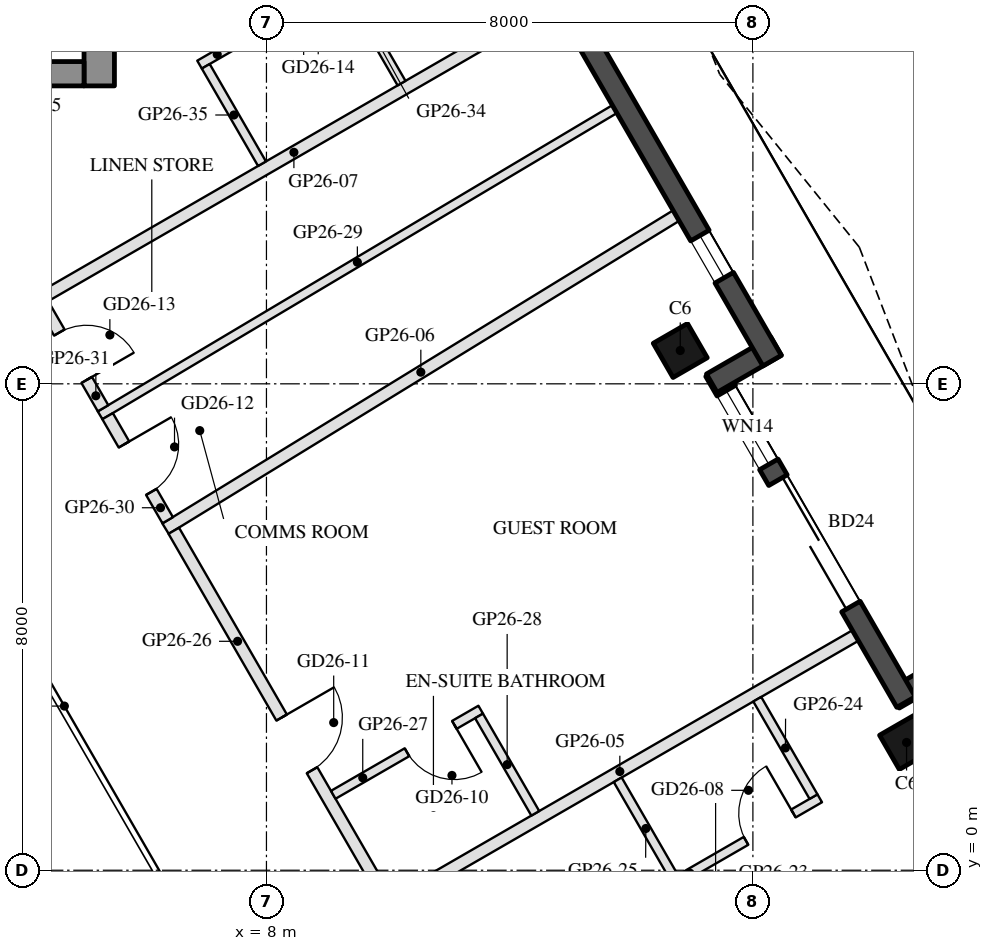
"""IFC4 building model, lengths in metres.
Left out: names, types, materials, properties, quantities, classifications, styles, units other than length and angle.
Written with IfcOpenShell. Run it as: python <this file> out.ifc"""

import sys

from ifc_helpers import new_model, si_unit, direction, frame, frame_2d, origin, origin_2d, place, context, subcontext, project, spatial, rectangle, hollow_rectangle, extrude, boolean, halfspace, element, fill, save


model = new_model("IFC4")
c1 = context("Model", 3, precision=1e-05, world=origin(), true_north=direction((0.0, 1.0)))
c2 = subcontext(c1, "Body", "Model", "MODEL_VIEW")
j1 = project(units=[si_unit("LENGTHUNIT", "METRE"), si_unit("PLANEANGLEUNIT", "RADIAN")], contexts=[c1])
p1 = place(None, origin())
s1 = spatial("IfcSite", under=j1, at=p1, CompositionType="ELEMENT")
p2 = place(p1, origin())
s2 = spatial("IfcBuilding", under=s1, at=p2, CompositionType="ELEMENT")
p3 = place(p2, frame((0.0, 0.0, 268.9)))
s3 = spatial("IfcBuildingStorey", under=s2, at=p3, CompositionType="ELEMENT", Elevation=268.9)
p4 = place(p3, frame((18.527, 2.102, 0.0), z_axis=(0.0, 0.0, 1.0), x_axis=(-0.5, 0.866025403784, 0.0)))
e1 = element("IfcColumn", 1, at=p4, inside=s3, PredefinedType="COLUMN", context=c2, shape_type="SweptSolid", body=[
    boolean("DIFFERENCE", extrude(hollow_rectangle(XDim=0.65, YDim=0.65, WallThickness=0.03, at=origin_2d()), origin(), (0.0, 0.0, 1.0), 3.7), halfspace(frame((0.0, 0.0, 0.04), z_axis=(0.0, 0.0, 1.0), x_axis=(1.0, 0.0, 0.0)), True)),
])
p5 = place(p3, frame((14.805, 8.548, 0.0), z_axis=(0.0, 0.0, 1.0), x_axis=(-0.5, 0.866025403784, 0.0)))
e2 = element("IfcColumn", 2, at=p5, inside=s3, PredefinedType="COLUMN", context=c2, shape_type="SweptSolid", body=[
    boolean("DIFFERENCE", extrude(hollow_rectangle(XDim=0.65, YDim=0.65, WallThickness=0.03, at=origin_2d()), origin(), (0.0, 0.0, 1.0), 3.7), halfspace(frame((0.0, 0.0, 0.037), z_axis=(0.0, 0.0, 1.0), x_axis=(1.0, 0.0, 0.0)), True)),
])
p6 = place(p3, frame((19.377, 3.429, 0.0), z_axis=(0.0, 0.0, 1.0), x_axis=(-0.866092288191, -0.499884134912, 0.0)))
e3 = element("IfcWall", 3, at=p6, inside=s3, PredefinedType="SOLIDWALL", context=c2, shape_type="SweptSolid", body=[
    extrude(rectangle(XDim=1.22, YDim=0.35, at=frame_2d((0.61, 0.0))), origin(), (0.0, 0.0, 1.0), 3.55),
])
p7 = place(p3, frame((18.519, 2.766, 0.0), z_axis=(0.0, 0.0, 1.0), x_axis=(-0.499995993298, 0.866027717042, 0.0)))
e4 = element("IfcWall", 4, at=p7, inside=s3, PredefinedType="SOLIDWALL", context=c2, shape_type="SweptSolid", body=[
    extrude(rectangle(XDim=6.284, YDim=0.35, at=frame_2d((3.142, 0.0))), origin(), (0.0, 0.0, 1.0), 3.55),
])
p8 = place(p7, frame((1.813, 0.0, 0.0)))
e5 = element("IfcOpeningElement", 5, at=p8, cuts=e4, PredefinedType="OPENING", context=c2, shape_type="SweptSolid", body=[
    extrude(rectangle(XDim=2.4, YDim=2.4, at=frame_2d((1.2, 1.2))), frame((0.0, 0.185, 0.0), z_axis=(0.0, -1.0, 0.0), x_axis=(1.0, 0.0, 0.0)), (0.0, 0.0, 1.0), 0.37),
])
p9 = place(p7, frame((4.513, 0.0, 0.3)))
e6 = element("IfcOpeningElement", 6, at=p9, cuts=e4, PredefinedType="OPENING", context=c2, shape_type="SweptSolid", body=[
    extrude(rectangle(XDim=1.4, YDim=2.65, at=frame_2d((0.7, 1.325))), frame((0.0, 0.185, 0.0), z_axis=(0.0, -1.0, 0.0), x_axis=(1.0, 0.0, 0.0)), (0.0, 0.0, 1.0), 0.37),
])
p10 = place(p3, frame((15.324, 8.01, 0.0), z_axis=(0.0, 0.0, 1.0), x_axis=(0.866005645448, 0.500034220881, 0.0)))
e7 = element("IfcWall", 7, at=p10, inside=s3, PredefinedType="SOLIDWALL", context=c2, shape_type="SweptSolid", body=[
    extrude(rectangle(XDim=1.22, YDim=0.35, at=frame_2d((0.61, 0.0))), origin(), (0.0, 0.0, 1.0), 3.55),
])
p11 = place(p3, frame((16.316, 8.381, 0.0), z_axis=(0.0, 0.0, 1.0), x_axis=(-0.500005190411, 0.866022407078, 0.0)))
e8 = element("IfcWall", 8, at=p11, inside=s3, PredefinedType="SOLIDWALL", context=c2, shape_type="SweptSolid", body=[
    extrude(rectangle(XDim=9.244, YDim=0.35, at=frame_2d((4.622, 0.0))), origin(), (0.0, 0.0, 1.0), 3.55),
])
p12 = place(p11, frame((1.575, 0.0, 0.3)))
e9 = element("IfcOpeningElement", 9, at=p12, cuts=e8, PredefinedType="OPENING", context=c2, shape_type="SweptSolid", body=[
    extrude(rectangle(XDim=0.8, YDim=2.65, at=frame_2d((0.4, 1.325))), frame((0.0, 0.185, 0.0), z_axis=(0.0, -1.0, 0.0), x_axis=(1.0, 0.0, 0.0)), (0.0, 0.0, 1.0), 0.37),
])
p13 = place(p3, frame((5.25, 12.9, 0.0), z_axis=(0.0, 0.0, 1.0), x_axis=(0.0, 1.0, 0.0)))
e10 = element("IfcWall", 10, at=p13, inside=s3, PredefinedType="SHEAR", context=c2, shape_type="SweptSolid", body=[
    extrude(rectangle(XDim=13.031, YDim=0.5, at=frame_2d((6.516, 0.0))), origin(), (0.0, 0.0, 1.0), 3.5),
])
p14 = place(p3, frame((5.0, 13.1, 0.0), z_axis=(0.0, 0.0, 1.0), x_axis=(-1.0, 0.0, 0.0)))
e11 = element("IfcWall", 11, at=p14, inside=s3, PredefinedType="SHEAR", context=c2, shape_type="SweptSolid", body=[
    extrude(rectangle(XDim=10.0, YDim=0.4, at=frame_2d((5.0, 0.0))), origin(), (0.0, 0.0, 1.0), 3.5),
])
p15 = place(p14, frame((3.55, 0.0, 0.0)))
e12 = element("IfcOpeningElement", 12, at=p15, cuts=e11, PredefinedType="OPENING", context=c2, shape_type="SweptSolid", body=[
    extrude(rectangle(XDim=1.1, YDim=2.1, at=frame_2d((0.55, 1.05))), frame((0.0, 0.21, 0.0), z_axis=(0.0, -1.0, 0.0), x_axis=(1.0, 0.0, 0.0)), (0.0, 0.0, 1.0), 0.42),
])
p16 = place(p14, frame((5.85, 0.0, 0.0)))
e13 = element("IfcOpeningElement", 13, at=p16, cuts=e11, PredefinedType="OPENING", context=c2, shape_type="SweptSolid", body=[
    extrude(rectangle(XDim=1.4, YDim=2.1, at=frame_2d((0.7, 1.05))), frame((0.0, 0.21, 0.0), z_axis=(0.0, -1.0, 0.0), x_axis=(1.0, 0.0, 0.0)), (0.0, 0.0, 1.0), 0.42),
])
p17 = place(p3, frame((17.685, 3.86, 0.0), z_axis=(0.0, 0.0, 1.0), x_axis=(-0.866026066645, -0.499998851889, 0.0)))
e14 = element("IfcWall", 14, at=p17, inside=s3, PredefinedType="PARTITIONING", context=c2, shape_type="SweptSolid", body=[
    extrude(rectangle(XDim=8.946, YDim=0.2, at=frame_2d((4.473, 0.0))), origin(), (0.0, 0.0, 1.0), 3.16),
])
p18 = place(p3, frame((14.737, 10.766, 0.0), z_axis=(0.0, 0.0, 1.0), x_axis=(-0.852501485732, -0.522724800277, 0.0)))
e15 = element("IfcWall", 15, at=p18, inside=s3, PredefinedType="PARTITIONING", context=c2, shape_type="SweptSolid", body=[
    extrude(rectangle(XDim=9.849, YDim=0.2, at=frame_2d((4.925, 0.0))), origin(), (0.0, 0.0, 1.0), 3.16),
])
p19 = place(p3, frame((12.715, 14.269, 0.0), z_axis=(0.0, 0.0, 1.0), x_axis=(-0.866024954444, -0.500000778279, 0.0)))
e16 = element("IfcWall", 16, at=p19, inside=s3, PredefinedType="PARTITIONING", context=c2, shape_type="SweptSolid", body=[
    extrude(rectangle(XDim=9.846, YDim=0.2, at=frame_2d((4.923, 0.0))), origin(), (0.0, 0.0, 1.0), 3.16),
])
p20 = place(p3, frame((14.674, -0.217, 0.0), z_axis=(0.0, 0.0, 1.0), x_axis=(0.866056369097, 0.49994636267, 0.0)))
e17 = element("IfcWall", 17, at=p20, inside=s3, PredefinedType="PARTITIONING", context=c2, shape_type="SweptSolid", body=[
    extrude(rectangle(XDim=2.8, YDim=0.15, at=frame_2d((1.4, 0.0))), origin(), (0.0, 0.0, 1.0), 3.0),
])
p21 = place(p20, frame((1.4, 0.0, 0.0)))
e18 = element("IfcOpeningElement", 18, at=p21, cuts=e17, PredefinedType="OPENING", context=c2, shape_type="SweptSolid", body=[
    extrude(rectangle(XDim=0.9, YDim=2.1, at=frame_2d((0.45, 1.05))), frame((0.0, 0.085, 0.0), z_axis=(0.0, -1.0, 0.0), x_axis=(1.0, 0.0, 0.0)), (0.0, 0.0, 1.0), 0.17),
])
p22 = place(p3, frame((16.997, 1.211, 0.0), z_axis=(0.0, 0.0, 1.0), x_axis=(-0.500042316284, 0.866000971088, 0.0)))
e19 = element("IfcWall", 19, at=p22, inside=s3, PredefinedType="PARTITIONING", context=c2, shape_type="SweptSolid", body=[
    extrude(rectangle(XDim=1.85, YDim=0.15, at=frame_2d((0.925, 0.0))), origin(), (0.0, 0.0, 1.0), 3.0),
])
p23 = place(p3, frame((14.702, -0.115, 0.0), z_axis=(0.0, 0.0, 1.0), x_axis=(-0.499985172903, 0.866033964044, 0.0)))
e20 = element("IfcWall", 20, at=p23, inside=s3, PredefinedType="PARTITIONING", context=c2, shape_type="SweptSolid", body=[
    extrude(rectangle(XDim=1.85, YDim=0.15, at=frame_2d((0.925, 0.0))), origin(), (0.0, 0.0, 1.0), 3.0),
])
p24 = place(p3, frame((6.476, 5.583, 0.0), z_axis=(0.0, 0.0, 1.0), x_axis=(0.499989243959, -0.866031613699, 0.0)))
e21 = element("IfcWall", 21, at=p24, inside=s3, PredefinedType="PARTITIONING", context=c2, shape_type="SweptSolid", body=[
    extrude(rectangle(XDim=6.997, YDim=0.2, at=frame_2d((3.499, 0.0))), origin(), (0.0, 0.0, 1.0), 3.0),
])
p25 = place(p24, frame((3.547, 0.0, 0.0)))
e22 = element("IfcOpeningElement", 22, at=p25, cuts=e21, PredefinedType="OPENING", context=c2, shape_type="SweptSolid", body=[
    extrude(rectangle(XDim=1.0, YDim=2.1, at=frame_2d((0.5, 1.05))), frame((0.0, 0.11, 0.0), z_axis=(0.0, -1.0, 0.0), x_axis=(1.0, 0.0, 0.0)), (0.0, 0.0, 1.0), 0.22),
])
p26 = place(p3, frame((11.524, 2.641, 0.0), z_axis=(0.0, 0.0, 1.0), x_axis=(-0.866018616679, -0.500011755427, 0.0)))
e23 = element("IfcWall", 23, at=p26, inside=s3, PredefinedType="PARTITIONING", context=c2, shape_type="SweptSolid", body=[
    extrude(rectangle(XDim=2.8, YDim=0.15, at=frame_2d((1.4, 0.0))), origin(), (0.0, 0.0, 1.0), 3.55),
])
p27 = place(p26, frame((0.5, 0.0, 0.0)))
e24 = element("IfcOpeningElement", 24, at=p27, cuts=e23, PredefinedType="OPENING", context=c2, shape_type="SweptSolid", body=[
    extrude(rectangle(XDim=0.9, YDim=2.1, at=frame_2d((0.45, 1.05))), frame((0.0, 0.085, 0.0), z_axis=(0.0, -1.0, 0.0), x_axis=(1.0, 0.0, 0.0)), (0.0, 0.0, 1.0), 0.17),
])
p28 = place(p3, frame((12.421, 0.936, 0.0), z_axis=(0.0, 0.0, 1.0), x_axis=(-0.500042316284, 0.866000971088, 0.0)))
e25 = element("IfcWall", 25, at=p28, inside=s3, PredefinedType="PARTITIONING", context=c2, shape_type="SweptSolid", body=[
    extrude(rectangle(XDim=1.85, YDim=0.15, at=frame_2d((0.925, 0.0))), origin(), (0.0, 0.0, 1.0), 3.0),
])
p29 = place(p3, frame((13.726, 12.518, 0.0), z_axis=(0.0, 0.0, 1.0), x_axis=(-0.859340362174, -0.511404088699, 0.0)))
e26 = element("IfcWall", 26, at=p29, inside=s3, PredefinedType="PARTITIONING", context=c2, shape_type="SweptSolid", body=[
    extrude(rectangle(XDim=9.847, YDim=0.15, at=frame_2d((4.923, 0.0))), origin(), (0.0, 0.0, 1.0), 3.0),
])
p30 = place(p3, frame((5.388, 7.468, 0.0), z_axis=(0.0, 0.0, 1.0), x_axis=(0.500071767444, -0.865983964866, 0.0)))
e27 = element("IfcWall", 27, at=p30, inside=s3, PredefinedType="PARTITIONING", context=c2, shape_type="SweptSolid", body=[
    extrude(rectangle(XDim=1.976, YDim=0.2, at=frame_2d((0.988, 0.0))), origin(), (0.0, 0.0, 1.0), 3.0),
])
p31 = place(p30, frame((0.538, 0.0, 0.0)))
e28 = element("IfcOpeningElement", 28, at=p31, cuts=e27, PredefinedType="OPENING", context=c2, shape_type="SweptSolid", body=[
    extrude(rectangle(XDim=0.9, YDim=2.1, at=frame_2d((0.45, 1.05))), frame((0.0, 0.11, 0.0), z_axis=(0.0, -1.0, 0.0), x_axis=(1.0, 0.0, 0.0)), (0.0, 0.0, 1.0), 0.22),
])
p32 = place(p3, frame((4.325, 9.31, 0.0), z_axis=(0.0, 0.0, 1.0), x_axis=(0.499925626596, -0.866068339032, 0.0)))
e29 = element("IfcWall", 29, at=p32, inside=s3, PredefinedType="PARTITIONING", context=c2, shape_type="SweptSolid", body=[
    extrude(rectangle(XDim=1.976, YDim=0.2, at=frame_2d((0.988, 0.0))), origin(), (0.0, 0.0, 1.0), 3.55),
])
p33 = place(p32, frame((0.538, 0.0, 0.0)))
e30 = element("IfcOpeningElement", 30, at=p33, cuts=e29, PredefinedType="OPENING", context=c2, shape_type="SweptSolid", body=[
    extrude(rectangle(XDim=0.9, YDim=2.1, at=frame_2d((0.45, 1.05))), frame((0.0, 0.11, 0.0), z_axis=(0.0, -1.0, 0.0), x_axis=(1.0, 0.0, 0.0)), (0.0, 0.0, 1.0), 0.22),
])
p34 = place(p3, frame((9.324, 14.65, 0.0), z_axis=(0.0, 0.0, 1.0), x_axis=(-0.866034573852, -0.49998411664, 0.0)))
e31 = element("IfcWall", 31, at=p34, inside=s3, PredefinedType="PARTITIONING", context=c2, shape_type="SweptSolid", body=[
    extrude(rectangle(XDim=2.8, YDim=0.15, at=frame_2d((1.4, 0.0))), origin(), (0.0, 0.0, 1.0), 3.55),
])
p35 = place(p34, frame((0.5, 0.0, 0.0)))
e32 = element("IfcOpeningElement", 32, at=p35, cuts=e31, PredefinedType="OPENING", context=c2, shape_type="SweptSolid", body=[
    extrude(rectangle(XDim=0.9, YDim=2.1, at=frame_2d((0.45, 1.05))), frame((0.0, 0.085, 0.0), z_axis=(0.0, -1.0, 0.0), x_axis=(1.0, 0.0, 0.0)), (0.0, 0.0, 1.0), 0.17),
])
for number, where, z_axis, x_axis in (
    (33, (10.222, 12.945, 0.0), (0.0, 0.0, 1.0), (-0.5, 0.866, 0.0)),
    (34, (7.927, 11.62, 0.0), (0.0, 0.0, 1.0), (-0.5, 0.866, 0.0)),
):
    element("IfcWall", number, at=place(p3, frame(where, z_axis=z_axis, x_axis=x_axis)), inside=s3, PredefinedType="PARTITIONING", context=c2, shape_type="SweptSolid", body=[
        extrude(rectangle(XDim=1.85, YDim=0.15, at=frame_2d((0.925, 0.0))), origin(), (0.0, 0.0, 1.0), 3.0),
    ])
p36 = place(p8, frame((2.4, 0.0, 0.0), z_axis=(0.0, 0.0, 1.0), x_axis=(-1.0, 0.0, 0.0)))
e35 = element("IfcDoor", 35, at=p36, inside=s3, OperationType="SLIDING_TO_LEFT", PredefinedType="DOOR", context=c2, shape_type="SweptSolid", body=[
    extrude(rectangle(XDim=2.4, YDim=2.4, at=frame_2d((1.2, 1.2))), frame((0.0, 0.025, 0.0), z_axis=(0.0, -1.0, 0.0), x_axis=(1.0, 0.0, 0.0)), (0.0, 0.0, 1.0), 0.05),
])
fill(e5, e35)
p37 = place(p9, origin())
e36 = element("IfcWindow", 36, at=p37, inside=s3, PartitioningType="SINGLE_PANEL", PredefinedType="WINDOW", context=c2, shape_type="SweptSolid", body=[
    extrude(rectangle(XDim=1.4, YDim=2.65, at=frame_2d((0.7, 1.325))), frame((0.0, 0.03, 0.0), z_axis=(0.0, -1.0, 0.0), x_axis=(1.0, 0.0, 0.0)), (0.0, 0.0, 1.0), 0.06),
])
fill(e6, e36)
p38 = place(p12, origin())
e37 = element("IfcWindow", 37, at=p38, inside=s3, PartitioningType="SINGLE_PANEL", PredefinedType="WINDOW", context=c2, shape_type="SweptSolid", body=[
    extrude(rectangle(XDim=0.8, YDim=2.65, at=frame_2d((0.4, 1.325))), frame((0.0, 0.03, 0.0), z_axis=(0.0, -1.0, 0.0), x_axis=(1.0, 0.0, 0.0)), (0.0, 0.0, 1.0), 0.06),
])
fill(e9, e37)
p39 = place(p21, origin())
e38 = element("IfcDoor", 38, at=p39, inside=s3, OperationType="SINGLE_SWING_RIGHT", PredefinedType="DOOR", context=c2, shape_type="SweptSolid", body=[
    extrude(rectangle(XDim=0.9, YDim=2.1, at=frame_2d((0.45, 1.05))), frame((0.0, 0.025, 0.0), z_axis=(0.0, -1.0, 0.0), x_axis=(1.0, 0.0, 0.0)), (0.0, 0.0, 1.0), 0.05),
])
fill(e18, e38)
p40 = place(p27, origin())
e39 = element("IfcDoor", 39, at=p40, inside=s3, OperationType="SINGLE_SWING_LEFT", PredefinedType="DOOR", context=c2, shape_type="SweptSolid", body=[
    extrude(rectangle(XDim=0.9, YDim=2.1, at=frame_2d((0.45, 1.05))), frame((0.0, 0.025, 0.0), z_axis=(0.0, -1.0, 0.0), x_axis=(1.0, 0.0, 0.0)), (0.0, 0.0, 1.0), 0.05),
])
fill(e24, e39)
p41 = place(p25, origin())
e40 = element("IfcDoor", 40, at=p41, inside=s3, OperationType="SINGLE_SWING_LEFT", PredefinedType="DOOR", context=c2, shape_type="SweptSolid", body=[
    extrude(rectangle(XDim=1.0, YDim=2.1, at=frame_2d((0.5, 1.05))), frame((0.0, 0.025, 0.0), z_axis=(0.0, -1.0, 0.0), x_axis=(1.0, 0.0, 0.0)), (0.0, 0.0, 1.0), 0.05),
])
fill(e22, e40)
p42 = place(p31, origin())
e41 = element("IfcDoor", 41, at=p42, inside=s3, OperationType="SINGLE_SWING_LEFT", PredefinedType="DOOR", context=c2, shape_type="SweptSolid", body=[
    extrude(rectangle(XDim=0.9, YDim=2.1, at=frame_2d((0.45, 1.05))), frame((0.0, 0.025, 0.0), z_axis=(0.0, -1.0, 0.0), x_axis=(1.0, 0.0, 0.0)), (0.0, 0.0, 1.0), 0.05),
])
fill(e28, e41)
p43 = place(p33, origin())
e42 = element("IfcDoor", 42, at=p43, inside=s3, OperationType="SINGLE_SWING_RIGHT", PredefinedType="DOOR", context=c2, shape_type="SweptSolid", body=[
    extrude(rectangle(XDim=0.9, YDim=2.1, at=frame_2d((0.45, 1.05))), frame((0.0, 0.025, 0.0), z_axis=(0.0, -1.0, 0.0), x_axis=(1.0, 0.0, 0.0)), (0.0, 0.0, 1.0), 0.05),
])
fill(e30, e42)
save(model, sys.argv[1])
